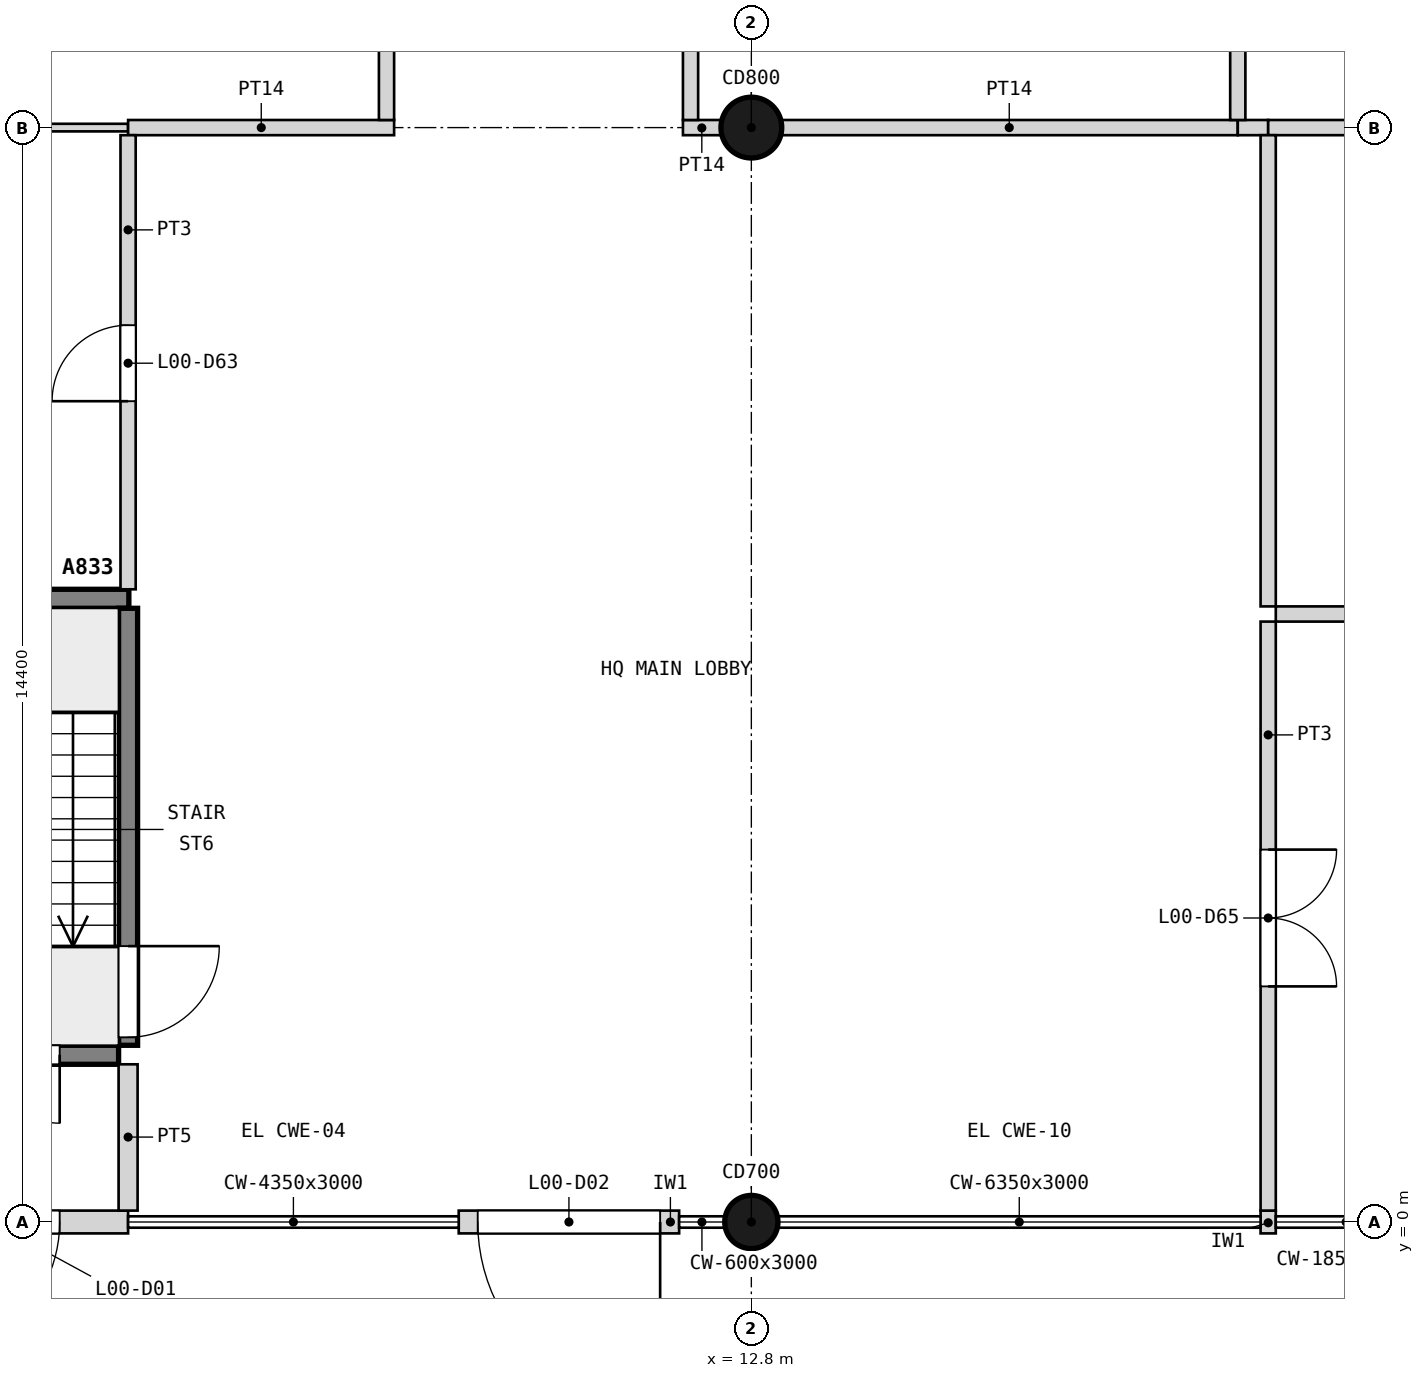
"""IFC4 building model, lengths in metres.
Left out: names, types, materials, properties, quantities, classifications, styles, units other than length and angle.
Written with IfcOpenShell. Run it as: python <this file> out.ifc"""

import sys

from ifc_helpers import new_model, si_unit, direction, frame, frame_2d, origin, origin_2d, place, context, subcontext, project, spatial, rectangle, circle, extrude, element, fill, save


model = new_model("IFC4")
c1 = context("Model", 3, precision=1e-05, world=origin(), true_north=direction((0.0, 1.0)))
c2 = subcontext(c1, "Body", "Model", "MODEL_VIEW")
j1 = project(units=[si_unit("LENGTHUNIT", "METRE"), si_unit("PLANEANGLEUNIT", "RADIAN")], contexts=[c1])
p1 = place(None, origin())
s1 = spatial("IfcSite", under=j1, at=p1, CompositionType="ELEMENT")
p2 = place(p1, origin())
s2 = spatial("IfcBuilding", under=s1, at=p2, CompositionType="ELEMENT")
p3 = place(p2, origin())
s3 = spatial("IfcBuildingStorey", under=s2, at=p3, CompositionType="ELEMENT", Elevation=0.0)
p4 = place(p3, frame((12.8, 0.0, 0.0), z_axis=(0.0, 0.0, 1.0), x_axis=(1.0, 0.0, 0.0)))
e1 = element("IfcColumn", 1, at=p4, inside=s3, PredefinedType="COLUMN", context=c2, shape_type="SweptSolid", body=[
    extrude(circle(Radius=0.35, at=origin_2d()), origin(), (0.0, 0.0, 1.0), 4.2),
])
p5 = place(p3, frame((12.8, 14.4, 0.0), z_axis=(0.0, 0.0, 1.0), x_axis=(1.0, 0.0, 0.0)))
e2 = element("IfcColumn", 2, at=p5, inside=s3, PredefinedType="COLUMN", context=c2, shape_type="SweptSolid", body=[
    extrude(circle(Radius=0.4, at=origin_2d()), origin(), (0.0, 0.0, 1.0), 4.2),
])
p6 = place(p3, frame((0.35, 0.0, 0.0), z_axis=(0.0, 0.0, 1.0), x_axis=(1.0, 0.0, 0.0)))
e3 = element("IfcWall", 3, at=p6, inside=s3, PredefinedType="SOLIDWALL", context=c2, shape_type="SweptSolid", body=[
    extrude(rectangle(XDim=4.25, YDim=0.3, at=frame_2d((2.125, 0.0))), origin(), (0.0, 0.0, 1.0), 3.0),
])
p7 = place(p6, frame((1.55, 0.0, 0.0)))
e4 = element("IfcOpeningElement", 4, at=p7, cuts=e3, PredefinedType="OPENING", context=c2, shape_type="SweptSolid", body=[
    extrude(rectangle(XDim=1.8, YDim=2.1, at=frame_2d((0.9, 1.05))), frame((0.0, 0.16, 0.0), z_axis=(0.0, -1.0, 0.0), x_axis=(1.0, 0.0, 0.0)), (0.0, 0.0, 1.0), 0.32),
])
p8 = place(p3, frame((8.95, 0.0, 0.0), z_axis=(0.0, 0.0, 1.0), x_axis=(1.0, 0.0, 0.0)))
e5 = element("IfcWall", 5, at=p8, inside=s3, PredefinedType="SOLIDWALL", context=c2, shape_type="SweptSolid", body=[
    extrude(rectangle(XDim=2.9, YDim=0.3, at=frame_2d((1.45, 0.0))), origin(), (0.0, 0.0, 1.0), 3.0),
])
p9 = place(p8, frame((0.25, 0.0, 0.0)))
e6 = element("IfcOpeningElement", 6, at=p9, cuts=e5, PredefinedType="OPENING", context=c2, shape_type="SweptSolid", body=[
    extrude(rectangle(XDim=2.4, YDim=2.4, at=frame_2d((1.2, 1.2))), frame((0.0, 0.16, 0.0), z_axis=(0.0, -1.0, 0.0), x_axis=(1.0, 0.0, 0.0)), (0.0, 0.0, 1.0), 0.32),
])
p10 = place(p3, frame((19.5, 0.0, 0.0), z_axis=(0.0, 0.0, 1.0), x_axis=(1.0, 0.0, 0.0)))
e7 = element("IfcWall", 7, at=p10, inside=s3, PredefinedType="SOLIDWALL", context=c2, shape_type="SweptSolid", body=[
    extrude(rectangle(XDim=0.2, YDim=0.3, at=frame_2d((0.1, 0.0))), origin(), (0.0, 0.0, 1.0), 3.0),
])
p11 = place(p3, frame((1.125, 2.2, 0.0), z_axis=(0.0, 0.0, 1.0), x_axis=(1.0, 0.0, 0.0)))
e8 = element("IfcWall", 8, at=p11, inside=s3, PredefinedType="SHEAR", context=c2, shape_type="SweptSolid", body=[
    extrude(rectangle(XDim=3.35, YDim=0.25, at=frame_2d((1.675, 0.0))), origin(), (0.0, 0.0, 1.0), 3.9),
])
p12 = place(p11, frame((0.775, 0.0, 0.0)))
e9 = element("IfcOpeningElement", 9, at=p12, cuts=e8, PredefinedType="OPENING", context=c2, shape_type="SweptSolid", body=[
    extrude(rectangle(XDim=1.8, YDim=2.1, at=frame_2d((0.9, 1.05))), frame((0.0, 0.135, 0.0), z_axis=(0.0, -1.0, 0.0), x_axis=(1.0, 0.0, 0.0)), (0.0, 0.0, 1.0), 0.27),
])
p13 = place(p3, frame((19.7, 8.0, 0.0), z_axis=(0.0, 0.0, 1.0), x_axis=(1.0, 0.0, 0.0)))
e10 = element("IfcWall", 10, at=p13, inside=s3, PredefinedType="PARTITIONING", context=c2, shape_type="SweptSolid", body=[
    extrude(rectangle(XDim=5.75, YDim=0.2, at=frame_2d((2.875, 0.0))), origin(), (0.0, 0.0, 1.0), 3.9),
])
p14 = place(p13, frame((2.4, 0.0, 0.0)))
e11 = element("IfcOpeningElement", 11, at=p14, cuts=e10, PredefinedType="OPENING", context=c2, shape_type="SweptSolid", body=[
    extrude(rectangle(XDim=1.0, YDim=2.1, at=frame_2d((0.5, 1.05))), frame((0.0, 0.11, 0.0), z_axis=(0.0, -1.0, 0.0), x_axis=(1.0, 0.0, 0.0)), (0.0, 0.0, 1.0), 0.22),
])
p15 = place(p3, frame((1.0, 8.2, 0.0), z_axis=(0.0, 0.0, 1.0), x_axis=(1.0, 0.0, 0.0)))
e12 = element("IfcWall", 12, at=p15, inside=s3, PredefinedType="SHEAR", context=c2, shape_type="SweptSolid", body=[
    extrude(rectangle(XDim=3.61, YDim=0.25, at=frame_2d((1.805, 0.0))), origin(), (0.0, 0.0, 1.0), 3.9),
])
p16 = place(p3, frame((0.32, 14.4, 0.0), z_axis=(0.0, 0.0, 1.0), x_axis=(1.0, 0.0, 0.0)))
e13 = element("IfcWall", 13, at=p16, inside=s3, PredefinedType="PARTITIONING", context=c2, shape_type="SweptSolid", body=[
    extrude(rectangle(XDim=4.28, YDim=0.1, at=frame_2d((2.14, 0.0))), origin(), (0.0, 0.0, 1.0), 3.1),
])
p17 = place(p3, frame((4.6, 14.4, 0.0), z_axis=(0.0, 0.0, 1.0), x_axis=(1.0, 0.0, 0.0)))
e14 = element("IfcWall", 14, at=p17, inside=s3, PredefinedType="PARTITIONING", context=c2, shape_type="SweptSolid", body=[
    extrude(rectangle(XDim=3.5, YDim=0.2, at=frame_2d((1.75, 0.0))), origin(), (0.0, 0.0, 1.0), 3.1),
])
p18 = place(p3, frame((11.9, 14.4, 0.0), z_axis=(0.0, 0.0, 1.0), x_axis=(1.0, 0.0, 0.0)))
e15 = element("IfcWall", 15, at=p18, inside=s3, PredefinedType="PARTITIONING", context=c2, shape_type="SweptSolid", body=[
    extrude(rectangle(XDim=0.5, YDim=0.2, at=frame_2d((0.25, 0.0))), origin(), (0.0, 0.0, 1.0), 3.1),
])
p19 = place(p3, frame((13.2, 14.4, 0.0), z_axis=(0.0, 0.0, 1.0), x_axis=(1.0, 0.0, 0.0)))
e16 = element("IfcWall", 16, at=p19, inside=s3, PredefinedType="PARTITIONING", context=c2, shape_type="SweptSolid", body=[
    extrude(rectangle(XDim=6.0, YDim=0.2, at=frame_2d((3.0, 0.0))), origin(), (0.0, 0.0, 1.0), 3.1),
])
p20 = place(p3, frame((19.2, 14.4, 0.0), z_axis=(0.0, 0.0, 1.0), x_axis=(1.0, 0.0, 0.0)))
e17 = element("IfcWall", 17, at=p20, inside=s3, PredefinedType="PARTITIONING", context=c2, shape_type="SweptSolid", body=[
    extrude(rectangle(XDim=0.4, YDim=0.2, at=frame_2d((0.2, 0.0))), origin(), (0.0, 0.0, 1.0), 3.1),
])
p21 = place(p3, frame((19.6, 14.4, 0.0), z_axis=(0.0, 0.0, 1.0), x_axis=(1.0, 0.0, 0.0)))
e18 = element("IfcWall", 18, at=p21, inside=s3, PredefinedType="PARTITIONING", context=c2, shape_type="SweptSolid", body=[
    extrude(rectangle(XDim=5.68, YDim=0.2, at=frame_2d((2.84, 0.0))), origin(), (0.0, 0.0, 1.0), 3.1),
])
p22 = place(p3, frame((4.6, 0.15, 0.0), z_axis=(0.0, 0.0, 1.0), x_axis=(0.0, 1.0, 0.0)))
e19 = element("IfcWall", 19, at=p22, inside=s3, PredefinedType="PARTITIONING", context=c2, shape_type="SweptSolid", body=[
    extrude(rectangle(XDim=1.925, YDim=0.25, at=frame_2d((0.962, 0.0))), origin(), (0.0, 0.0, 1.0), 3.9),
])
p23 = place(p3, frame((4.6, 2.325, 0.0), z_axis=(0.0, 0.0, 1.0), x_axis=(0.0, 1.0, 0.0)))
e20 = element("IfcWall", 20, at=p23, inside=s3, PredefinedType="SHEAR", context=c2, shape_type="SweptSolid", body=[
    extrude(rectangle(XDim=5.75, YDim=0.25, at=frame_2d((2.875, 0.0))), origin(), (0.0, 0.0, 1.0), 3.9),
])
p24 = place(p23, frame((0.105, 0.0, 0.0)))
e21 = element("IfcOpeningElement", 21, at=p24, cuts=e20, PredefinedType="OPENING", context=c2, shape_type="SweptSolid", body=[
    extrude(rectangle(XDim=1.2, YDim=2.1, at=frame_2d((0.6, 1.05))), frame((0.0, 0.135, 0.0), z_axis=(0.0, -1.0, 0.0), x_axis=(1.0, 0.0, 0.0)), (0.0, 0.0, 1.0), 0.27),
])
p25 = place(p3, frame((4.6, 8.325, 0.0), z_axis=(0.0, 0.0, 1.0), x_axis=(0.0, 1.0, 0.0)))
e22 = element("IfcWall", 22, at=p25, inside=s3, PredefinedType="PARTITIONING", context=c2, shape_type="SweptSolid", body=[
    extrude(rectangle(XDim=5.975, YDim=0.2, at=frame_2d((2.988, 0.0))), origin(), (0.0, 0.0, 1.0), 3.9),
])
p26 = place(p25, frame((2.475, 0.0, 0.0)))
e23 = element("IfcOpeningElement", 23, at=p26, cuts=e22, PredefinedType="OPENING", context=c2, shape_type="SweptSolid", body=[
    extrude(rectangle(XDim=1.0, YDim=2.1, at=frame_2d((0.5, 1.05))), frame((0.0, 0.11, 0.0), z_axis=(0.0, -1.0, 0.0), x_axis=(1.0, 0.0, 0.0)), (0.0, 0.0, 1.0), 0.22),
])
p27 = place(p3, frame((8.0, 14.5, 0.0), z_axis=(0.0, 0.0, 1.0), x_axis=(0.0, 1.0, 0.0)))
e24 = element("IfcWall", 24, at=p27, inside=s3, PredefinedType="PARTITIONING", context=c2, shape_type="SweptSolid", body=[
    extrude(rectangle(XDim=7.8, YDim=0.2, at=frame_2d((3.9, 0.0))), origin(), (0.0, 0.0, 1.0), 3.9),
])
p28 = place(p27, frame((3.4, 0.0, 0.0)))
e25 = element("IfcOpeningElement", 25, at=p28, cuts=e24, PredefinedType="OPENING", context=c2, shape_type="SweptSolid", body=[
    extrude(rectangle(XDim=1.0, YDim=2.1, at=frame_2d((0.5, 1.05))), frame((0.0, 0.11, 0.0), z_axis=(0.0, -1.0, 0.0), x_axis=(1.0, 0.0, 0.0)), (0.0, 0.0, 1.0), 0.22),
])
p29 = place(p3, frame((12.0, 14.5, 0.0), z_axis=(0.0, 0.0, 1.0), x_axis=(0.0, 1.0, 0.0)))
e26 = element("IfcWall", 26, at=p29, inside=s3, PredefinedType="PARTITIONING", context=c2, shape_type="SweptSolid", body=[
    extrude(rectangle(XDim=7.812, YDim=0.2, at=frame_2d((3.906, 0.0))), origin(), (0.0, 0.0, 1.0), 3.9),
])
p30 = place(p3, frame((19.2, 14.5, 0.0), z_axis=(0.0, 0.0, 1.0), x_axis=(0.0, 1.0, 0.0)))
e27 = element("IfcWall", 27, at=p30, inside=s3, PredefinedType="PARTITIONING", context=c2, shape_type="SweptSolid", body=[
    extrude(rectangle(XDim=7.812, YDim=0.2, at=frame_2d((3.906, 0.0))), origin(), (0.0, 0.0, 1.0), 3.0),
])
p31 = place(p30, frame((3.4, 0.0, 0.0)))
e28 = element("IfcOpeningElement", 28, at=p31, cuts=e27, PredefinedType="OPENING", context=c2, shape_type="SweptSolid", body=[
    extrude(rectangle(XDim=1.0, YDim=2.1, at=frame_2d((0.5, 1.05))), frame((0.0, 0.11, 0.0), z_axis=(0.0, -1.0, 0.0), x_axis=(1.0, 0.0, 0.0)), (0.0, 0.0, 1.0), 0.22),
])
p32 = place(p3, frame((19.6, 0.15, 0.0), z_axis=(0.0, 0.0, 1.0), x_axis=(0.0, 1.0, 0.0)))
e29 = element("IfcWall", 29, at=p32, inside=s3, PredefinedType="PARTITIONING", context=c2, shape_type="SweptSolid", body=[
    extrude(rectangle(XDim=7.75, YDim=0.2, at=frame_2d((3.875, 0.0))), origin(), (0.0, 0.0, 1.0), 3.9),
])
p33 = place(p32, frame((2.95, 0.0, 0.0)))
e30 = element("IfcOpeningElement", 30, at=p33, cuts=e29, PredefinedType="OPENING", context=c2, shape_type="SweptSolid", body=[
    extrude(rectangle(XDim=1.8, YDim=2.1, at=frame_2d((0.9, 1.05))), frame((0.0, 0.11, 0.0), z_axis=(0.0, -1.0, 0.0), x_axis=(1.0, 0.0, 0.0)), (0.0, 0.0, 1.0), 0.22),
])
p34 = place(p3, frame((19.6, 8.1, 0.0), z_axis=(0.0, 0.0, 1.0), x_axis=(0.0, 1.0, 0.0)))
e31 = element("IfcWall", 31, at=p34, inside=s3, PredefinedType="PARTITIONING", context=c2, shape_type="SweptSolid", body=[
    extrude(rectangle(XDim=6.2, YDim=0.2, at=frame_2d((3.1, 0.0))), origin(), (0.0, 0.0, 1.0), 3.9),
])
p35 = place(p7, frame((1.8, 0.0, 0.0), z_axis=(0.0, 0.0, 1.0), x_axis=(-1.0, 0.0, 0.0)))
e32 = element("IfcDoor", 32, at=p35, inside=s3, OperationType="SINGLE_SWING_RIGHT", PredefinedType="DOOR", context=c2, shape_type="SweptSolid", body=[
    extrude(rectangle(XDim=1.8, YDim=2.1, at=frame_2d((0.9, 1.05))), frame((0.0, 0.025, 0.0), z_axis=(0.0, -1.0, 0.0), x_axis=(1.0, 0.0, 0.0)), (0.0, 0.0, 1.0), 0.05),
])
fill(e4, e32)
p36 = place(p9, frame((2.4, 0.0, 0.0), z_axis=(0.0, 0.0, 1.0), x_axis=(-1.0, 0.0, 0.0)))
e33 = element("IfcDoor", 33, at=p36, inside=s3, OperationType="SINGLE_SWING_LEFT", PredefinedType="DOOR", context=c2, shape_type="SweptSolid", body=[
    extrude(rectangle(XDim=2.4, YDim=2.4, at=frame_2d((1.2, 1.2))), frame((0.0, 0.025, 0.0), z_axis=(0.0, -1.0, 0.0), x_axis=(1.0, 0.0, 0.0)), (0.0, 0.0, 1.0), 0.05),
])
fill(e6, e33)
p37 = place(p24, frame((1.2, 0.0, 0.0), z_axis=(0.0, 0.0, 1.0), x_axis=(-1.0, 0.0, 0.0)))
e34 = element("IfcDoor", 34, at=p37, inside=s3, OperationType="SINGLE_SWING_LEFT", PredefinedType="DOOR", context=c2, shape_type="SweptSolid", body=[
    extrude(rectangle(XDim=1.2, YDim=2.1, at=frame_2d((0.6, 1.05))), frame((0.0, 0.025, 0.0), z_axis=(0.0, -1.0, 0.0), x_axis=(1.0, 0.0, 0.0)), (0.0, 0.0, 1.0), 0.05),
])
fill(e21, e34)
p38 = place(p12, frame((1.8, 0.0, 0.0), z_axis=(0.0, 0.0, 1.0), x_axis=(-1.0, 0.0, 0.0)))
e35 = element("IfcDoor", 35, at=p38, inside=s3, OperationType="DOUBLE_DOOR_SINGLE_SWING", PredefinedType="DOOR", context=c2, shape_type="SweptSolid", body=[
    extrude(rectangle(XDim=1.8, YDim=2.1, at=frame_2d((0.9, 1.05))), frame((0.0, 0.025, 0.0), z_axis=(0.0, -1.0, 0.0), x_axis=(1.0, 0.0, 0.0)), (0.0, 0.0, 1.0), 0.05),
])
fill(e9, e35)
p39 = place(p26, origin())
e36 = element("IfcDoor", 36, at=p39, inside=s3, OperationType="SINGLE_SWING_LEFT", PredefinedType="DOOR", context=c2, shape_type="SweptSolid", body=[
    extrude(rectangle(XDim=1.0, YDim=2.1, at=frame_2d((0.5, 1.05))), frame((0.0, 0.025, 0.0), z_axis=(0.0, -1.0, 0.0), x_axis=(1.0, 0.0, 0.0)), (0.0, 0.0, 1.0), 0.05),
])
fill(e23, e36)
p40 = place(p33, frame((1.8, 0.0, 0.0), z_axis=(0.0, 0.0, 1.0), x_axis=(-1.0, 0.0, 0.0)))
e37 = element("IfcDoor", 37, at=p40, inside=s3, OperationType="DOUBLE_DOOR_SINGLE_SWING", PredefinedType="DOOR", context=c2, shape_type="SweptSolid", body=[
    extrude(rectangle(XDim=1.8, YDim=2.1, at=frame_2d((0.9, 1.05))), frame((0.0, 0.025, 0.0), z_axis=(0.0, -1.0, 0.0), x_axis=(1.0, 0.0, 0.0)), (0.0, 0.0, 1.0), 0.05),
])
fill(e30, e37)
save(model, sys.argv[1])
